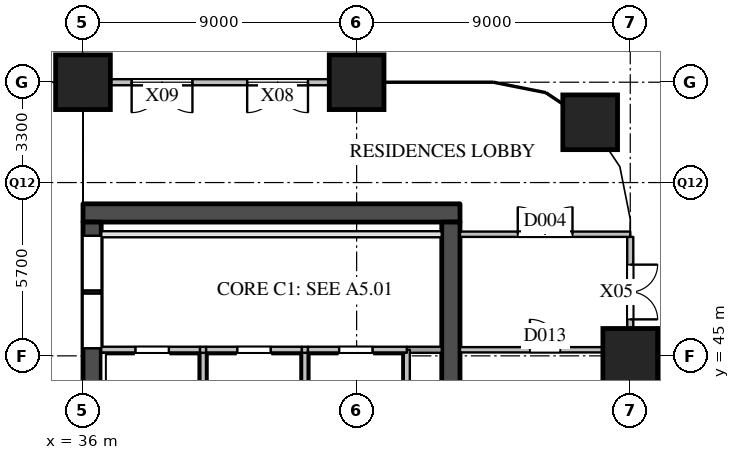
"""IFC4 building model, lengths in metres.
Left out: names, types, materials, properties, quantities, classifications, styles, units other than length and angle.
Written with IfcOpenShell. Run it as: python <this file> out.ifc"""

import sys

from ifc_helpers import new_model, si_unit, direction, frame, frame_2d, origin, origin_2d, place, context, subcontext, project, spatial, rectangle, extrude, element, fill, save


model = new_model("IFC4")
c1 = context("Model", 3, precision=1e-05, world=origin(), true_north=direction((0.0, 1.0)))
c2 = subcontext(c1, "Body", "Model", "MODEL_VIEW")
j1 = project(units=[si_unit("LENGTHUNIT", "METRE"), si_unit("PLANEANGLEUNIT", "RADIAN")], contexts=[c1])
p1 = place(None, origin())
s1 = spatial("IfcSite", under=j1, at=p1, CompositionType="ELEMENT")
p2 = place(p1, origin())
s2 = spatial("IfcBuilding", under=s1, at=p2, CompositionType="ELEMENT")
p3 = place(p2, origin())
s3 = spatial("IfcBuildingStorey", under=s2, at=p3, CompositionType="ELEMENT", Elevation=0.0)
for number, where, z_axis, x_axis in (
    (1, (36.0, 54.0, 0.0), (0.0, 0.0, 1.0), (1.0, 0.0, 0.0)),
    (2, (45.0, 54.0, 0.0), (0.0, 0.0, 1.0), (1.0, 0.0, 0.0)),
    (3, (54.0, 45.0, 0.0), (0.0, 0.0, 1.0), (1.0, 0.0, 0.0)),
    (4, (52.682, 52.682, 0.0), (0.0, 0.0, 1.0), (1.0, 0.0, 0.0)),
):
    element("IfcColumn", number, at=place(p3, frame(where, z_axis=z_axis, x_axis=x_axis)), inside=s3, PredefinedType="COLUMN", context=c2, shape_type="SweptSolid", body=[
        extrude(rectangle(XDim=1.8, YDim=1.8, at=origin_2d()), origin(), (0.0, 0.0, 1.0), 8.0),
    ])
p4 = place(p3, frame((54.0, 45.9, 0.0), z_axis=(0.0, 0.0, 1.0), x_axis=(0.0, 1.0, 0.0)))
e5 = element("IfcWall", 5, at=p4, inside=s3, PredefinedType="SOLIDWALL", context=c2, shape_type="SweptSolid", body=[
    extrude(rectangle(XDim=3.013, YDim=0.2, at=frame_2d((1.506, 0.0))), origin(), (0.0, 0.0, 1.0), 6.59),
])
p5 = place(p4, frame((2.1, 0.0, 0.0), z_axis=(0.0, 0.0, 1.0), x_axis=(-1.0, 0.0, 0.0)))
e6 = element("IfcOpeningElement", 6, at=p5, cuts=e5, PredefinedType="OPENING", context=c2, shape_type="SweptSolid", body=[
    extrude(rectangle(XDim=1.8, YDim=2.4, at=frame_2d((0.9, 1.2))), frame((0.0, 0.11, 0.0), z_axis=(0.0, -1.0, 0.0), x_axis=(1.0, 0.0, 0.0)), (0.0, 0.0, 1.0), 0.22),
])
p6 = place(p3, frame((44.1, 54.0, 0.0), z_axis=(0.0, 0.0, 1.0), x_axis=(-1.0, 0.0, 0.0)))
e7 = element("IfcWall", 7, at=p6, inside=s3, PredefinedType="SOLIDWALL", context=c2, shape_type="SweptSolid", body=[
    extrude(rectangle(XDim=7.2, YDim=0.2, at=frame_2d((3.6, 0.0))), origin(), (0.0, 0.0, 1.0), 6.59),
])
p7 = place(p6, frame((0.7, 0.0, 0.0)))
e8 = element("IfcOpeningElement", 8, at=p7, cuts=e7, PredefinedType="OPENING", context=c2, shape_type="SweptSolid", body=[
    extrude(rectangle(XDim=2.0, YDim=2.4, at=frame_2d((1.0, 1.2))), frame((0.0, 0.11, 0.0), z_axis=(0.0, -1.0, 0.0), x_axis=(1.0, 0.0, 0.0)), (0.0, 0.0, 1.0), 0.22),
])
p8 = place(p6, frame((0.7, 0.0, 2.5)))
e9 = element("IfcOpeningElement", 9, at=p8, cuts=e7, PredefinedType="OPENING", context=c2, shape_type="SweptSolid", body=[
    extrude(rectangle(XDim=2.0, YDim=3.99, at=frame_2d((1.0, 1.995))), frame((0.0, 0.11, 0.0), z_axis=(0.0, -1.0, 0.0), x_axis=(1.0, 0.0, 0.0)), (0.0, 0.0, 1.0), 0.22),
])
p9 = place(p6, frame((4.5, 0.0, 0.0)))
e10 = element("IfcOpeningElement", 10, at=p9, cuts=e7, PredefinedType="OPENING", context=c2, shape_type="SweptSolid", body=[
    extrude(rectangle(XDim=2.0, YDim=2.4, at=frame_2d((1.0, 1.2))), frame((0.0, 0.11, 0.0), z_axis=(0.0, -1.0, 0.0), x_axis=(1.0, 0.0, 0.0)), (0.0, 0.0, 1.0), 0.22),
])
p10 = place(p6, frame((4.5, 0.0, 2.5)))
e11 = element("IfcOpeningElement", 11, at=p10, cuts=e7, PredefinedType="OPENING", context=c2, shape_type="SweptSolid", body=[
    extrude(rectangle(XDim=2.0, YDim=3.99, at=frame_2d((1.0, 1.995))), frame((0.0, 0.11, 0.0), z_axis=(0.0, -1.0, 0.0), x_axis=(1.0, 0.0, 0.0)), (0.0, 0.0, 1.0), 0.22),
])
p11 = place(p3, frame((36.0, 49.7, 0.0), z_axis=(0.0, 0.0, 1.0), x_axis=(1.0, 0.0, 0.0)))
e12 = element("IfcWall", 12, at=p11, inside=s3, PredefinedType="SHEAR", context=c2, shape_type="SweptSolid", body=[
    extrude(rectangle(XDim=12.4, YDim=0.6, at=frame_2d((6.2, 0.0))), origin(), (0.0, 0.0, 1.0), 7.59),
])
p12 = place(p3, frame((36.3, 29.1, 0.0), z_axis=(0.0, 0.0, 1.0), x_axis=(0.0, 1.0, 0.0)))
e13 = element("IfcWall", 13, at=p12, inside=s3, PredefinedType="SHEAR", context=c2, shape_type="SweptSolid", body=[
    extrude(rectangle(XDim=20.3, YDim=0.6, at=frame_2d((10.15, 0.0))), origin(), (0.0, 0.0, 1.0), 7.59),
])
p13 = place(p12, frame((3.6, 0.0, 0.0)))
e14 = element("IfcOpeningElement", 14, at=p13, cuts=e13, PredefinedType="OPENING", context=c2, shape_type="SweptSolid", body=[
    extrude(rectangle(XDim=1.8, YDim=2.1, at=frame_2d((0.9, 1.05))), frame((0.0, 0.31, 0.0), z_axis=(0.0, -1.0, 0.0), x_axis=(1.0, 0.0, 0.0)), (0.0, 0.0, 1.0), 0.62),
])
p14 = place(p12, frame((16.15, 0.0, 0.0)))
e15 = element("IfcOpeningElement", 15, at=p14, cuts=e13, PredefinedType="OPENING", context=c2, shape_type="SweptSolid", body=[
    extrude(rectangle(XDim=1.8, YDim=2.4, at=frame_2d((0.9, 1.2))), frame((0.0, 0.31, 0.0), z_axis=(0.0, -1.0, 0.0), x_axis=(1.0, 0.0, 0.0)), (0.0, 0.0, 1.0), 0.62),
])
p15 = place(p12, frame((18.05, 0.0, 0.0)))
e16 = element("IfcOpeningElement", 16, at=p15, cuts=e13, PredefinedType="OPENING", context=c2, shape_type="SweptSolid", body=[
    extrude(rectangle(XDim=1.8, YDim=2.4, at=frame_2d((0.9, 1.2))), frame((0.0, 0.31, 0.0), z_axis=(0.0, -1.0, 0.0), x_axis=(1.0, 0.0, 0.0)), (0.0, 0.0, 1.0), 0.62),
])
p16 = place(p3, frame((48.1, 29.1, 0.0), z_axis=(0.0, 0.0, 1.0), x_axis=(0.0, 1.0, 0.0)))
e17 = element("IfcWall", 17, at=p16, inside=s3, PredefinedType="SHEAR", context=c2, shape_type="SweptSolid", body=[
    extrude(rectangle(XDim=20.3, YDim=0.6, at=frame_2d((10.15, 0.0))), origin(), (0.0, 0.0, 1.0), 7.59),
])
p17 = place(p16, frame((12.5, 0.0, 0.0)))
e18 = element("IfcOpeningElement", 18, at=p17, cuts=e17, PredefinedType="OPENING", context=c2, shape_type="SweptSolid", body=[
    extrude(rectangle(XDim=0.7, YDim=2.1, at=frame_2d((0.35, 1.05))), frame((0.0, 0.31, 0.0), z_axis=(0.0, -1.0, 0.0), x_axis=(1.0, 0.0, 0.0)), (0.0, 0.0, 1.0), 0.62),
])
p18 = place(p16, frame((4.0, 0.0, 0.0)))
e19 = element("IfcOpeningElement", 19, at=p18, cuts=e17, PredefinedType="OPENING", context=c2, shape_type="SweptSolid", body=[
    extrude(rectangle(XDim=1.0, YDim=2.1, at=frame_2d((0.5, 1.05))), frame((0.0, 0.31, 0.0), z_axis=(0.0, -1.0, 0.0), x_axis=(1.0, 0.0, 0.0)), (0.0, 0.0, 1.0), 0.62),
])
for number, where, z_axis, x_axis in (
    (20, (39.95, 43.58, 0.0), (0.0, 0.0, 1.0), (0.0, 1.0, 0.0)),
    (21, (43.3, 43.58, 0.0), (0.0, 0.0, 1.0), (0.0, 1.0, 0.0)),
    (22, (46.65, 43.58, 0.0), (0.0, 0.0, 1.0), (0.0, 1.0, 0.0)),
):
    element("IfcWall", number, at=place(p3, frame(where, z_axis=z_axis, x_axis=x_axis)), inside=s3, PredefinedType="SOLIDWALL", context=c2, shape_type="SweptSolid", body=[
        extrude(rectangle(XDim=1.62, YDim=0.2, at=frame_2d((0.81, 0.0))), origin(), (0.0, 0.0, 1.0), 7.59),
    ])
p19 = place(p3, frame((46.65, 45.2, 0.0), z_axis=(0.0, 0.0, 1.0), x_axis=(1.0, 0.0, 0.0)))
e23 = element("IfcWall", 23, at=p19, inside=s3, PredefinedType="SOLIDWALL", context=c2, shape_type="SweptSolid", body=[
    extrude(rectangle(XDim=1.15, YDim=0.2, at=frame_2d((0.575, 0.0))), origin(), (0.0, 0.0, 1.0), 7.59),
])
p20 = place(p3, frame((36.6, 45.2, 0.0), z_axis=(0.0, 0.0, 1.0), x_axis=(1.0, 0.0, 0.0)))
e24 = element("IfcWall", 24, at=p20, inside=s3, PredefinedType="SOLIDWALL", context=c2, shape_type="SweptSolid", body=[
    extrude(rectangle(XDim=3.25, YDim=0.2, at=frame_2d((1.625, 0.0))), origin(), (0.0, 0.0, 1.0), 7.59),
])
p21 = place(p20, frame((1.125, 0.0, 0.0)))
e25 = element("IfcOpeningElement", 25, at=p21, cuts=e24, PredefinedType="OPENING", context=c2, shape_type="SweptSolid", body=[
    extrude(rectangle(XDim=1.1, YDim=2.1, at=frame_2d((0.55, 1.05))), frame((0.0, 0.11, 0.0), z_axis=(0.0, -1.0, 0.0), x_axis=(1.0, 0.0, 0.0)), (0.0, 0.0, 1.0), 0.22),
])
p22 = place(p3, frame((39.85, 45.2, 0.0), z_axis=(0.0, 0.0, 1.0), x_axis=(1.0, 0.0, 0.0)))
e26 = element("IfcWall", 26, at=p22, inside=s3, PredefinedType="SOLIDWALL", context=c2, shape_type="SweptSolid", body=[
    extrude(rectangle(XDim=0.2, YDim=0.2, at=frame_2d((0.1, 0.0))), origin(), (0.0, 0.0, 1.0), 7.59),
])
p23 = place(p3, frame((40.05, 45.2, 0.0), z_axis=(0.0, 0.0, 1.0), x_axis=(1.0, 0.0, 0.0)))
e27 = element("IfcWall", 27, at=p23, inside=s3, PredefinedType="SOLIDWALL", context=c2, shape_type="SweptSolid", body=[
    extrude(rectangle(XDim=3.15, YDim=0.2, at=frame_2d((1.575, 0.0))), origin(), (0.0, 0.0, 1.0), 7.59),
])
p24 = place(p23, frame((1.025, 0.0, 0.0)))
e28 = element("IfcOpeningElement", 28, at=p24, cuts=e27, PredefinedType="OPENING", context=c2, shape_type="SweptSolid", body=[
    extrude(rectangle(XDim=1.1, YDim=2.1, at=frame_2d((0.55, 1.05))), frame((0.0, 0.11, 0.0), z_axis=(0.0, -1.0, 0.0), x_axis=(1.0, 0.0, 0.0)), (0.0, 0.0, 1.0), 0.22),
])
p25 = place(p3, frame((43.2, 45.2, 0.0), z_axis=(0.0, 0.0, 1.0), x_axis=(1.0, 0.0, 0.0)))
e29 = element("IfcWall", 29, at=p25, inside=s3, PredefinedType="SOLIDWALL", context=c2, shape_type="SweptSolid", body=[
    extrude(rectangle(XDim=0.2, YDim=0.2, at=frame_2d((0.1, 0.0))), origin(), (0.0, 0.0, 1.0), 7.59),
])
p26 = place(p3, frame((43.4, 45.2, 0.0), z_axis=(0.0, 0.0, 1.0), x_axis=(1.0, 0.0, 0.0)))
e30 = element("IfcWall", 30, at=p26, inside=s3, PredefinedType="SOLIDWALL", context=c2, shape_type="SweptSolid", body=[
    extrude(rectangle(XDim=3.25, YDim=0.2, at=frame_2d((1.625, 0.0))), origin(), (0.0, 0.0, 1.0), 7.59),
])
p27 = place(p26, frame((1.025, 0.0, 0.0)))
e31 = element("IfcOpeningElement", 31, at=p27, cuts=e30, PredefinedType="OPENING", context=c2, shape_type="SweptSolid", body=[
    extrude(rectangle(XDim=1.1, YDim=2.1, at=frame_2d((0.55, 1.05))), frame((0.0, 0.11, 0.0), z_axis=(0.0, -1.0, 0.0), x_axis=(1.0, 0.0, 0.0)), (0.0, 0.0, 1.0), 0.22),
])
p28 = place(p3, frame((36.6, 49.0, 0.0), z_axis=(0.0, 0.0, 1.0), x_axis=(1.0, 0.0, 0.0)))
e32 = element("IfcWall", 32, at=p28, inside=s3, PredefinedType="PARTITIONING", context=c2, shape_type="SweptSolid", body=[
    extrude(rectangle(XDim=11.2, YDim=0.2, at=frame_2d((5.6, 0.0))), origin(), (0.0, 0.0, 1.0), 7.59),
])
p29 = place(p3, frame((48.4, 45.2, 0.0), z_axis=(0.0, 0.0, 1.0), x_axis=(1.0, 0.0, 0.0)))
e33 = element("IfcWall", 33, at=p29, inside=s3, PredefinedType="PARTITIONING", context=c2, shape_type="SweptSolid", body=[
    extrude(rectangle(XDim=5.6, YDim=0.175, at=frame_2d((2.8, 0.0))), origin(), (0.0, 0.0, 1.0), 7.59),
])
p30 = place(p29, frame((2.3, 0.0, 0.0)))
e34 = element("IfcOpeningElement", 34, at=p30, cuts=e33, PredefinedType="OPENING", context=c2, shape_type="SweptSolid", body=[
    extrude(rectangle(XDim=1.0, YDim=2.1, at=frame_2d((0.5, 1.05))), frame((0.0, 0.097, 0.0), z_axis=(0.0, -1.0, 0.0), x_axis=(1.0, 0.0, 0.0)), (0.0, 0.0, 1.0), 0.195),
])
p31 = place(p3, frame((48.4, 49.0, 0.0), z_axis=(0.0, 0.0, 1.0), x_axis=(1.0, 0.0, 0.0)))
e35 = element("IfcWall", 35, at=p31, inside=s3, PredefinedType="PARTITIONING", context=c2, shape_type="SweptSolid", body=[
    extrude(rectangle(XDim=5.6, YDim=0.175, at=frame_2d((2.8, 0.0))), origin(), (0.0, 0.0, 1.0), 6.59),
])
p32 = place(p31, frame((1.9, 0.0, 0.0)))
e36 = element("IfcOpeningElement", 36, at=p32, cuts=e35, PredefinedType="OPENING", context=c2, shape_type="SweptSolid", body=[
    extrude(rectangle(XDim=1.8, YDim=2.1, at=frame_2d((0.9, 1.05))), frame((0.0, 0.097, 0.0), z_axis=(0.0, -1.0, 0.0), x_axis=(1.0, 0.0, 0.0)), (0.0, 0.0, 1.0), 0.195),
])
p33 = place(p5, origin())
e37 = element("IfcDoor", 37, at=p33, inside=s3, OperationType="DOUBLE_DOOR_SINGLE_SWING", PredefinedType="DOOR", context=c2, shape_type="SweptSolid", body=[
    extrude(rectangle(XDim=1.8, YDim=2.4, at=frame_2d((0.9, 1.2))), frame((0.0, 0.025, 0.0), z_axis=(0.0, -1.0, 0.0), x_axis=(1.0, 0.0, 0.0)), (0.0, 0.0, 1.0), 0.05),
])
fill(e6, e37)
p34 = place(p7, origin())
e38 = element("IfcDoor", 38, at=p34, inside=s3, OperationType="DOUBLE_DOOR_SINGLE_SWING", PredefinedType="DOOR", context=c2, shape_type="SweptSolid", body=[
    extrude(rectangle(XDim=2.0, YDim=2.4, at=frame_2d((1.0, 1.2))), frame((0.0, 0.025, 0.0), z_axis=(0.0, -1.0, 0.0), x_axis=(1.0, 0.0, 0.0)), (0.0, 0.0, 1.0), 0.05),
])
fill(e8, e38)
p35 = place(p8, origin())
e39 = element("IfcWindow", 39, at=p35, inside=s3, PartitioningType="SINGLE_PANEL", PredefinedType="WINDOW", context=c2, shape_type="SweptSolid", body=[
    extrude(rectangle(XDim=2.0, YDim=3.99, at=frame_2d((1.0, 1.995))), frame((0.0, 0.03, 0.0), z_axis=(0.0, -1.0, 0.0), x_axis=(1.0, 0.0, 0.0)), (0.0, 0.0, 1.0), 0.06),
])
fill(e9, e39)
p36 = place(p9, origin())
e40 = element("IfcDoor", 40, at=p36, inside=s3, OperationType="DOUBLE_DOOR_SINGLE_SWING", PredefinedType="DOOR", context=c2, shape_type="SweptSolid", body=[
    extrude(rectangle(XDim=2.0, YDim=2.4, at=frame_2d((1.0, 1.2))), frame((0.0, 0.025, 0.0), z_axis=(0.0, -1.0, 0.0), x_axis=(1.0, 0.0, 0.0)), (0.0, 0.0, 1.0), 0.05),
])
fill(e10, e40)
p37 = place(p10, origin())
e41 = element("IfcWindow", 41, at=p37, inside=s3, PartitioningType="SINGLE_PANEL", PredefinedType="WINDOW", context=c2, shape_type="SweptSolid", body=[
    extrude(rectangle(XDim=2.0, YDim=3.99, at=frame_2d((1.0, 1.995))), frame((0.0, 0.03, 0.0), z_axis=(0.0, -1.0, 0.0), x_axis=(1.0, 0.0, 0.0)), (0.0, 0.0, 1.0), 0.06),
])
fill(e11, e41)
p38 = place(p21, origin())
e42 = element("IfcDoor", 42, at=p38, inside=s3, OperationType="SINGLE_SWING_RIGHT", PredefinedType="DOOR", context=c2, shape_type="SweptSolid", body=[
    extrude(rectangle(XDim=1.1, YDim=2.1, at=frame_2d((0.55, 1.05))), frame((0.0, 0.025, 0.0), z_axis=(0.0, -1.0, 0.0), x_axis=(1.0, 0.0, 0.0)), (0.0, 0.0, 1.0), 0.05),
])
fill(e25, e42)
p39 = place(p24, origin())
e43 = element("IfcDoor", 43, at=p39, inside=s3, OperationType="SINGLE_SWING_LEFT", PredefinedType="DOOR", context=c2, shape_type="SweptSolid", body=[
    extrude(rectangle(XDim=1.1, YDim=2.1, at=frame_2d((0.55, 1.05))), frame((0.0, 0.025, 0.0), z_axis=(0.0, -1.0, 0.0), x_axis=(1.0, 0.0, 0.0)), (0.0, 0.0, 1.0), 0.05),
])
fill(e28, e43)
p40 = place(p27, origin())
e44 = element("IfcDoor", 44, at=p40, inside=s3, OperationType="SINGLE_SWING_LEFT", PredefinedType="DOOR", context=c2, shape_type="SweptSolid", body=[
    extrude(rectangle(XDim=1.1, YDim=2.1, at=frame_2d((0.55, 1.05))), frame((0.0, 0.025, 0.0), z_axis=(0.0, -1.0, 0.0), x_axis=(1.0, 0.0, 0.0)), (0.0, 0.0, 1.0), 0.05),
])
fill(e31, e44)
p41 = place(p14, origin())
e45 = element("IfcDoor", 45, at=p41, inside=s3, OperationType="DOUBLE_DOOR_SINGLE_SWING", PredefinedType="DOOR", context=c2, shape_type="SweptSolid", body=[
    extrude(rectangle(XDim=1.8, YDim=2.4, at=frame_2d((0.9, 1.2))), frame((0.0, 0.025, 0.0), z_axis=(0.0, -1.0, 0.0), x_axis=(1.0, 0.0, 0.0)), (0.0, 0.0, 1.0), 0.05),
])
fill(e15, e45)
p42 = place(p15, origin())
e46 = element("IfcDoor", 46, at=p42, inside=s3, OperationType="DOUBLE_DOOR_SINGLE_SWING", PredefinedType="DOOR", context=c2, shape_type="SweptSolid", body=[
    extrude(rectangle(XDim=1.8, YDim=2.4, at=frame_2d((0.9, 1.2))), frame((0.0, 0.025, 0.0), z_axis=(0.0, -1.0, 0.0), x_axis=(1.0, 0.0, 0.0)), (0.0, 0.0, 1.0), 0.05),
])
fill(e16, e46)
p43 = place(p32, origin())
e47 = element("IfcDoor", 47, at=p43, inside=s3, OperationType="DOUBLE_DOOR_SINGLE_SWING", PredefinedType="DOOR", context=c2, shape_type="SweptSolid", body=[
    extrude(rectangle(XDim=1.8, YDim=2.1, at=frame_2d((0.9, 1.05))), frame((0.0, 0.025, 0.0), z_axis=(0.0, -1.0, 0.0), x_axis=(1.0, 0.0, 0.0)), (0.0, 0.0, 1.0), 0.05),
])
fill(e36, e47)
p44 = place(p30, origin())
e48 = element("IfcDoor", 48, at=p44, inside=s3, OperationType="SINGLE_SWING_LEFT", PredefinedType="DOOR", context=c2, shape_type="SweptSolid", body=[
    extrude(rectangle(XDim=1.0, YDim=2.1, at=frame_2d((0.5, 1.05))), frame((0.0, 0.025, 0.0), z_axis=(0.0, -1.0, 0.0), x_axis=(1.0, 0.0, 0.0)), (0.0, 0.0, 1.0), 0.05),
])
fill(e34, e48)
save(model, sys.argv[1])
